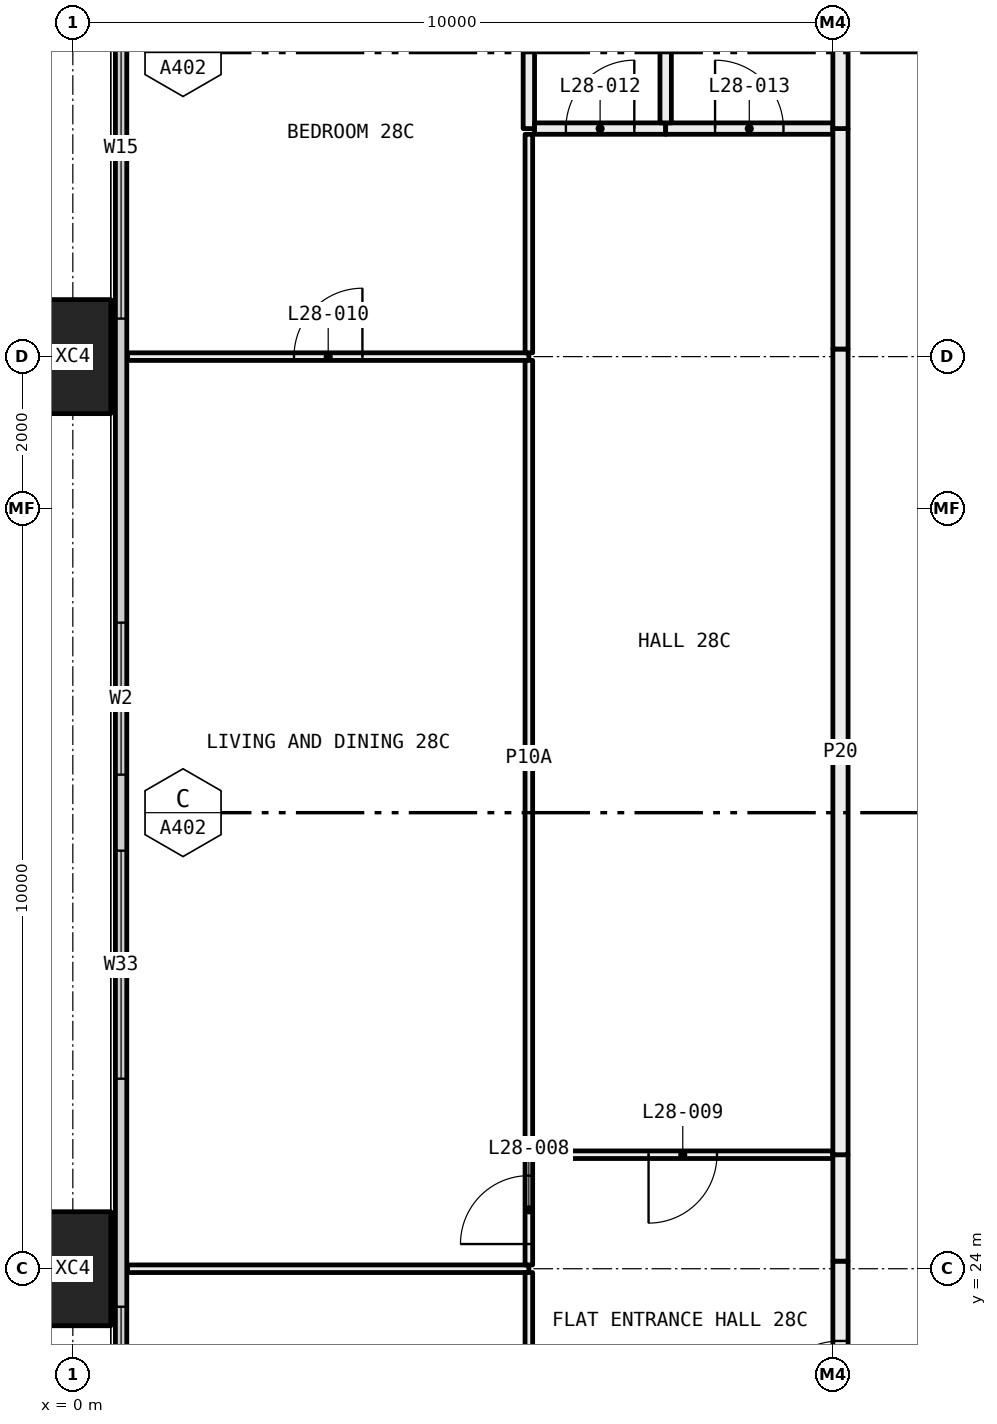
"""IFC4 building model, lengths in metres.
Left out: names, types, materials, properties, quantities, classifications, styles, units other than length and angle.
Written with IfcOpenShell. Run it as: python <this file> out.ifc"""

import sys

from ifc_helpers import new_model, si_unit, direction, frame, frame_2d, origin, origin_2d, place, context, subcontext, project, spatial, rectangle, hollow_rectangle, extrude, element, fill, save


model = new_model("IFC4")
c1 = context("Model", 3, precision=1e-05, world=origin(), true_north=direction((0.0, 1.0)))
c2 = subcontext(c1, "Body", "Model", "MODEL_VIEW")
j1 = project(units=[si_unit("LENGTHUNIT", "METRE"), si_unit("PLANEANGLEUNIT", "RADIAN")], contexts=[c1])
p1 = place(None, origin())
s1 = spatial("IfcSite", under=j1, at=p1, CompositionType="ELEMENT")
p2 = place(p1, origin())
s2 = spatial("IfcBuilding", under=s1, at=p2, CompositionType="ELEMENT")
p3 = place(p2, frame((0.0, 0.0, 110.4)))
s3 = spatial("IfcBuildingStorey", under=s2, at=p3, CompositionType="ELEMENT", Elevation=110.4)
for number, where, z_axis, x_axis in (
    (1, (0.0, 24.0, -0.4), (0.0, 0.0, 1.0), (0.0, 1.0, 0.0)),
    (2, (0.0, 36.0, -0.4), (0.0, 0.0, 1.0), (0.0, 1.0, 0.0)),
):
    element("IfcColumn", number, at=place(p3, frame(where, z_axis=z_axis, x_axis=x_axis)), inside=s3, PredefinedType="COLUMN", context=c2, shape_type="SweptSolid", body=[
        extrude(hollow_rectangle(XDim=1.5, YDim=1.0, WallThickness=0.06, at=origin_2d()), origin(), (0.0, 0.0, 1.0), 3.45),
    ])
p4 = place(p3, frame((0.635, 18.71, 0.0), z_axis=(0.0, 0.0, 1.0), x_axis=(0.0, 1.0, 0.0)))
e3 = element("IfcWall", 3, at=p4, inside=s3, PredefinedType="ELEMENTEDWALL", context=c2, shape_type="SweptSolid", body=[
    extrude(rectangle(XDim=22.58, YDim=0.15, at=frame_2d((11.29, 0.0))), origin(), (0.0, 0.0, 1.0), 3.05),
])
p5 = place(p4, frame((0.29, 0.0, 0.45)))
e4 = element("IfcOpeningElement", 4, at=p5, cuts=e3, PredefinedType="OPENING", context=c2, shape_type="SweptSolid", body=[
    extrude(rectangle(XDim=4.5, YDim=2.55, at=frame_2d((2.25, 1.275))), frame((0.0, 0.085, 0.0), z_axis=(0.0, -1.0, 0.0), x_axis=(1.0, 0.0, 0.0)), (0.0, 0.0, 1.0), 0.17),
])
p6 = place(p4, frame((7.79, 0.0, 0.45)))
e5 = element("IfcOpeningElement", 5, at=p6, cuts=e3, PredefinedType="OPENING", context=c2, shape_type="SweptSolid", body=[
    extrude(rectangle(XDim=3.0, YDim=2.55, at=frame_2d((1.5, 1.275))), frame((0.0, 0.085, 0.0), z_axis=(0.0, -1.0, 0.0), x_axis=(1.0, 0.0, 0.0)), (0.0, 0.0, 1.0), 0.17),
])
p7 = place(p4, frame((11.79, 0.0, 0.45)))
e6 = element("IfcOpeningElement", 6, at=p7, cuts=e3, PredefinedType="OPENING", context=c2, shape_type="SweptSolid", body=[
    extrude(rectangle(XDim=2.0, YDim=2.55, at=frame_2d((1.0, 1.275))), frame((0.0, 0.085, 0.0), z_axis=(0.0, -1.0, 0.0), x_axis=(1.0, 0.0, 0.0)), (0.0, 0.0, 1.0), 0.17),
])
p8 = place(p4, frame((17.79, 0.0, 0.45)))
e7 = element("IfcOpeningElement", 7, at=p8, cuts=e3, PredefinedType="OPENING", context=c2, shape_type="SweptSolid", body=[
    extrude(rectangle(XDim=4.5, YDim=2.55, at=frame_2d((2.25, 1.275))), frame((0.0, 0.085, 0.0), z_axis=(0.0, -1.0, 0.0), x_axis=(1.0, 0.0, 0.0)), (0.0, 0.0, 1.0), 0.17),
])
p9 = place(p3, frame((6.0, 24.0, 0.0), z_axis=(0.0, 0.0, 1.0), x_axis=(-1.0, 0.0, 0.0)))
e8 = element("IfcWall", 8, at=p9, inside=s3, PredefinedType="PARTITIONING", context=c2, shape_type="SweptSolid", body=[
    extrude(rectangle(XDim=5.28, YDim=0.1, at=frame_2d((2.64, 0.0))), origin(), (0.0, 0.0, 1.0), 2.45),
])
p10 = place(p3, frame((6.0, 21.075, 0.0), z_axis=(0.0, 0.0, 1.0), x_axis=(0.0, 1.0, 0.0)))
e9 = element("IfcWall", 9, at=p10, inside=s3, PredefinedType="PARTITIONING", context=c2, shape_type="SweptSolid", body=[
    extrude(rectangle(XDim=2.875, YDim=0.1, at=frame_2d((1.438, 0.0))), origin(), (0.0, 0.0, 1.0), 2.45),
])
p11 = place(p10, frame((0.988, 0.0, 0.0)))
e10 = element("IfcOpeningElement", 10, at=p11, cuts=e9, PredefinedType="OPENING", context=c2, shape_type="SweptSolid", body=[
    extrude(rectangle(XDim=0.9, YDim=2.1, at=frame_2d((0.45, 1.05))), frame((0.0, 0.06, 0.0), z_axis=(0.0, -1.0, 0.0), x_axis=(1.0, 0.0, 0.0)), (0.0, 0.0, 1.0), 0.12),
])
p12 = place(p3, frame((6.0, 36.0, 0.0), z_axis=(0.0, 0.0, 1.0), x_axis=(-1.0, 0.0, 0.0)))
e11 = element("IfcWall", 11, at=p12, inside=s3, PredefinedType="PARTITIONING", context=c2, shape_type="SweptSolid", body=[
    extrude(rectangle(XDim=5.28, YDim=0.1, at=frame_2d((2.64, 0.0))), origin(), (0.0, 0.0, 1.0), 2.45),
])
p13 = place(p12, frame((2.19, 0.0, 0.0)))
e12 = element("IfcOpeningElement", 12, at=p13, cuts=e11, PredefinedType="OPENING", context=c2, shape_type="SweptSolid", body=[
    extrude(rectangle(XDim=0.9, YDim=2.1, at=frame_2d((0.45, 1.05))), frame((0.0, 0.06, 0.0), z_axis=(0.0, -1.0, 0.0), x_axis=(1.0, 0.0, 0.0)), (0.0, 0.0, 1.0), 0.12),
])
p14 = place(p3, frame((6.0, 24.05, 0.0), z_axis=(0.0, 0.0, 1.0), x_axis=(0.0, 1.0, 0.0)))
e13 = element("IfcWall", 13, at=p14, inside=s3, PredefinedType="PARTITIONING", context=c2, shape_type="SweptSolid", body=[
    extrude(rectangle(XDim=1.45, YDim=0.1, at=frame_2d((0.725, 0.0))), origin(), (0.0, 0.0, 1.0), 2.45),
])
p15 = place(p14, frame((0.275, 0.0, 0.0)))
e14 = element("IfcOpeningElement", 14, at=p15, cuts=e13, PredefinedType="OPENING", context=c2, shape_type="SweptSolid", body=[
    extrude(rectangle(XDim=0.9, YDim=2.1, at=frame_2d((0.45, 1.05))), frame((0.0, 0.06, 0.0), z_axis=(0.0, -1.0, 0.0), x_axis=(1.0, 0.0, 0.0)), (0.0, 0.0, 1.0), 0.12),
])
p16 = place(p3, frame((6.0, 25.5, 0.0), z_axis=(0.0, 0.0, 1.0), x_axis=(0.0, 1.0, 0.0)))
e15 = element("IfcWall", 15, at=p16, inside=s3, PredefinedType="PARTITIONING", context=c2, shape_type="SweptSolid", body=[
    extrude(rectangle(XDim=10.45, YDim=0.1, at=frame_2d((5.225, 0.0))), origin(), (0.0, 0.0, 1.0), 2.45),
])
p17 = place(p3, frame((6.0, 36.05, 0.0), z_axis=(0.0, 0.0, 1.0), x_axis=(0.0, 1.0, 0.0)))
e16 = element("IfcWall", 16, at=p17, inside=s3, PredefinedType="PARTITIONING", context=c2, shape_type="SweptSolid", body=[
    extrude(rectangle(XDim=2.875, YDim=0.1, at=frame_2d((1.438, 0.0))), origin(), (0.0, 0.0, 1.0), 2.45),
])
p18 = place(p3, frame((6.0, 39.0, 0.0), z_axis=(0.0, 0.0, 1.0), x_axis=(0.0, 1.0, 0.0)))
e17 = element("IfcWall", 17, at=p18, inside=s3, PredefinedType="PARTITIONING", context=c2, shape_type="SweptSolid", body=[
    extrude(rectangle(XDim=2.28, YDim=0.15, at=frame_2d((1.14, 0.0))), origin(), (0.0, 0.0, 1.0), 3.05),
])
p19 = place(p3, frame((10.0, 25.5, 0.0), z_axis=(0.0, 0.0, 1.0), x_axis=(-1.0, 0.0, 0.0)))
e18 = element("IfcWall", 18, at=p19, inside=s3, PredefinedType="PARTITIONING", context=c2, shape_type="SweptSolid", body=[
    extrude(rectangle(XDim=3.95, YDim=0.1, at=frame_2d((1.975, 0.0))), origin(), (0.0, 0.0, 1.0), 3.05),
])
p20 = place(p19, frame((1.525, 0.0, 0.0)))
e19 = element("IfcOpeningElement", 19, at=p20, cuts=e18, PredefinedType="OPENING", context=c2, shape_type="SweptSolid", body=[
    extrude(rectangle(XDim=0.9, YDim=2.1, at=frame_2d((0.45, 1.05))), frame((0.0, 0.06, 0.0), z_axis=(0.0, -1.0, 0.0), x_axis=(1.0, 0.0, 0.0)), (0.0, 0.0, 1.0), 0.12),
])
p21 = place(p3, frame((10.1, 21.0, 0.0), z_axis=(0.0, 0.0, 1.0), x_axis=(0.0, 1.0, 0.0)))
e20 = element("IfcWall", 20, at=p21, inside=s3, PredefinedType="PARTITIONING", context=c2, shape_type="SweptSolid", body=[
    extrude(rectangle(XDim=3.1, YDim=0.2, at=frame_2d((1.55, 0.0))), origin(), (0.0, 0.0, 1.0), 2.45),
])
p22 = place(p21, frame((1.05, 0.0, 0.0)))
e21 = element("IfcOpeningElement", 21, at=p22, cuts=e20, PredefinedType="OPENING", context=c2, shape_type="SweptSolid", body=[
    extrude(rectangle(XDim=1.0, YDim=2.1, at=frame_2d((0.5, 1.05))), frame((0.0, 0.11, 0.0), z_axis=(0.0, -1.0, 0.0), x_axis=(1.0, 0.0, 0.0)), (0.0, 0.0, 1.0), 0.22),
])
p23 = place(p3, frame((10.1, 24.1, 0.0), z_axis=(0.0, 0.0, 1.0), x_axis=(0.0, 1.0, 0.0)))
e22 = element("IfcWall", 22, at=p23, inside=s3, PredefinedType="PARTITIONING", context=c2, shape_type="SweptSolid", body=[
    extrude(rectangle(XDim=1.4, YDim=0.2, at=frame_2d((0.7, 0.0))), origin(), (0.0, 0.0, 1.0), 3.05),
])
p24 = place(p3, frame((7.8, 39.0, 0.0), z_axis=(0.0, 0.0, 1.0), x_axis=(-1.0, 0.0, 0.0)))
e23 = element("IfcWall", 23, at=p24, inside=s3, PredefinedType="PARTITIONING", context=c2, shape_type="SweptSolid", body=[
    extrude(rectangle(XDim=1.725, YDim=0.15, at=frame_2d((0.863, 0.0))), origin(), (0.0, 0.0, 1.0), 3.05),
])
p25 = place(p24, frame((0.413, 0.0, 0.0)))
e24 = element("IfcOpeningElement", 24, at=p25, cuts=e23, PredefinedType="OPENING", context=c2, shape_type="SweptSolid", body=[
    extrude(rectangle(XDim=0.9, YDim=2.1, at=frame_2d((0.45, 1.05))), frame((0.0, 0.085, 0.0), z_axis=(0.0, -1.0, 0.0), x_axis=(1.0, 0.0, 0.0)), (0.0, 0.0, 1.0), 0.17),
])
p26 = place(p3, frame((10.0, 39.0, 0.0), z_axis=(0.0, 0.0, 1.0), x_axis=(-1.0, 0.0, 0.0)))
e25 = element("IfcWall", 25, at=p26, inside=s3, PredefinedType="PARTITIONING", context=c2, shape_type="SweptSolid", body=[
    extrude(rectangle(XDim=2.2, YDim=0.15, at=frame_2d((1.1, 0.0))), origin(), (0.0, 0.0, 1.0), 3.05),
])
p27 = place(p26, frame((0.65, 0.0, 0.0)))
e26 = element("IfcOpeningElement", 26, at=p27, cuts=e25, PredefinedType="OPENING", context=c2, shape_type="SweptSolid", body=[
    extrude(rectangle(XDim=0.9, YDim=2.1, at=frame_2d((0.45, 1.05))), frame((0.0, 0.085, 0.0), z_axis=(0.0, -1.0, 0.0), x_axis=(1.0, 0.0, 0.0)), (0.0, 0.0, 1.0), 0.17),
])
p28 = place(p3, frame((10.1, 25.5, 0.0), z_axis=(0.0, 0.0, 1.0), x_axis=(0.0, 1.0, 0.0)))
e27 = element("IfcWall", 27, at=p28, inside=s3, PredefinedType="PARTITIONING", context=c2, shape_type="SweptSolid", body=[
    extrude(rectangle(XDim=10.6, YDim=0.2, at=frame_2d((5.3, 0.0))), origin(), (0.0, 0.0, 1.0), 2.45),
])
p29 = place(p3, frame((10.1, 36.1, 0.0), z_axis=(0.0, 0.0, 1.0), x_axis=(0.0, 1.0, 0.0)))
e28 = element("IfcWall", 28, at=p29, inside=s3, PredefinedType="PARTITIONING", context=c2, shape_type="SweptSolid", body=[
    extrude(rectangle(XDim=2.9, YDim=0.2, at=frame_2d((1.45, 0.0))), origin(), (0.0, 0.0, 1.0), 3.05),
])
p30 = place(p3, frame((7.8, 39.075, 0.0), z_axis=(0.0, 0.0, 1.0), x_axis=(0.0, 1.0, 0.0)))
e29 = element("IfcWall", 29, at=p30, inside=s3, PredefinedType="PARTITIONING", context=c2, shape_type="SweptSolid", body=[
    extrude(rectangle(XDim=2.825, YDim=0.15, at=frame_2d((1.413, 0.0))), origin(), (0.0, 0.0, 1.0), 3.05),
])
p31 = place(p3, frame((10.1, 39.0, 0.0), z_axis=(0.0, 0.0, 1.0), x_axis=(0.0, 1.0, 0.0)))
e30 = element("IfcWall", 30, at=p31, inside=s3, PredefinedType="PARTITIONING", context=c2, shape_type="SweptSolid", body=[
    extrude(rectangle(XDim=2.9, YDim=0.2, at=frame_2d((1.45, 0.0))), origin(), (0.0, 0.0, 1.0), 3.05),
])
p32 = place(p5, origin())
e31 = element("IfcWindow", 31, at=p32, inside=s3, PartitioningType="SINGLE_PANEL", PredefinedType="WINDOW", context=c2, shape_type="SweptSolid", body=[
    extrude(rectangle(XDim=4.5, YDim=2.55, at=frame_2d((2.25, 1.275))), frame((0.0, 0.03, 0.0), z_axis=(0.0, -1.0, 0.0), x_axis=(1.0, 0.0, 0.0)), (0.0, 0.0, 1.0), 0.06),
])
fill(e4, e31)
p33 = place(p6, origin())
e32 = element("IfcWindow", 32, at=p33, inside=s3, PartitioningType="SINGLE_PANEL", PredefinedType="WINDOW", context=c2, shape_type="SweptSolid", body=[
    extrude(rectangle(XDim=3.0, YDim=2.55, at=frame_2d((1.5, 1.275))), frame((0.0, 0.03, 0.0), z_axis=(0.0, -1.0, 0.0), x_axis=(1.0, 0.0, 0.0)), (0.0, 0.0, 1.0), 0.06),
])
fill(e5, e32)
p34 = place(p7, origin())
e33 = element("IfcWindow", 33, at=p34, inside=s3, PartitioningType="SINGLE_PANEL", PredefinedType="WINDOW", context=c2, shape_type="SweptSolid", body=[
    extrude(rectangle(XDim=2.0, YDim=2.55, at=frame_2d((1.0, 1.275))), frame((0.0, 0.03, 0.0), z_axis=(0.0, -1.0, 0.0), x_axis=(1.0, 0.0, 0.0)), (0.0, 0.0, 1.0), 0.06),
])
fill(e6, e33)
p35 = place(p8, origin())
e34 = element("IfcWindow", 34, at=p35, inside=s3, PartitioningType="SINGLE_PANEL", PredefinedType="WINDOW", context=c2, shape_type="SweptSolid", body=[
    extrude(rectangle(XDim=4.5, YDim=2.55, at=frame_2d((2.25, 1.275))), frame((0.0, 0.03, 0.0), z_axis=(0.0, -1.0, 0.0), x_axis=(1.0, 0.0, 0.0)), (0.0, 0.0, 1.0), 0.06),
])
fill(e7, e34)
p36 = place(p22, origin())
e35 = element("IfcDoor", 35, at=p36, inside=s3, OperationType="SINGLE_SWING_RIGHT", PredefinedType="DOOR", context=c2, shape_type="SweptSolid", body=[
    extrude(rectangle(XDim=1.0, YDim=2.1, at=frame_2d((0.5, 1.05))), frame((0.0, 0.025, 0.0), z_axis=(0.0, -1.0, 0.0), x_axis=(1.0, 0.0, 0.0)), (0.0, 0.0, 1.0), 0.05),
])
fill(e21, e35)
p37 = place(p15, origin())
e36 = element("IfcDoor", 36, at=p37, inside=s3, OperationType="SINGLE_SWING_RIGHT", PredefinedType="DOOR", context=c2, shape_type="SweptSolid", body=[
    extrude(rectangle(XDim=0.9, YDim=2.1, at=frame_2d((0.45, 1.05))), frame((0.0, 0.025, 0.0), z_axis=(0.0, -1.0, 0.0), x_axis=(1.0, 0.0, 0.0)), (0.0, 0.0, 1.0), 0.05),
])
fill(e14, e36)
p38 = place(p20, origin())
e37 = element("IfcDoor", 37, at=p38, inside=s3, OperationType="SINGLE_SWING_LEFT", PredefinedType="DOOR", context=c2, shape_type="SweptSolid", body=[
    extrude(rectangle(XDim=0.9, YDim=2.1, at=frame_2d((0.45, 1.05))), frame((0.0, 0.025, 0.0), z_axis=(0.0, -1.0, 0.0), x_axis=(1.0, 0.0, 0.0)), (0.0, 0.0, 1.0), 0.05),
])
fill(e19, e37)
p39 = place(p13, frame((0.9, 0.0, 0.0), x_axis=(-1.0, 0.0, 0.0)))
e38 = element("IfcDoor", 38, at=p39, inside=s3, OperationType="SINGLE_SWING_LEFT", PredefinedType="DOOR", context=c2, shape_type="SweptSolid", body=[
    extrude(rectangle(XDim=0.9, YDim=2.1, at=frame_2d((0.45, 1.05))), frame((0.0, 0.025, 0.0), z_axis=(0.0, -1.0, 0.0), x_axis=(1.0, 0.0, 0.0)), (0.0, 0.0, 1.0), 0.05),
])
fill(e12, e38)
p40 = place(p25, frame((0.9, 0.0, 0.0), x_axis=(-1.0, 0.0, 0.0)))
e39 = element("IfcDoor", 39, at=p40, inside=s3, OperationType="SINGLE_SWING_LEFT", PredefinedType="DOOR", context=c2, shape_type="SweptSolid", body=[
    extrude(rectangle(XDim=0.9, YDim=2.1, at=frame_2d((0.45, 1.05))), frame((0.0, 0.025, 0.0), z_axis=(0.0, -1.0, 0.0), x_axis=(1.0, 0.0, 0.0)), (0.0, 0.0, 1.0), 0.05),
])
fill(e24, e39)
p41 = place(p27, frame((0.9, 0.0, 0.0), x_axis=(-1.0, 0.0, 0.0)))
e40 = element("IfcDoor", 40, at=p41, inside=s3, OperationType="SINGLE_SWING_RIGHT", PredefinedType="DOOR", context=c2, shape_type="SweptSolid", body=[
    extrude(rectangle(XDim=0.9, YDim=2.1, at=frame_2d((0.45, 1.05))), frame((0.0, 0.025, 0.0), z_axis=(0.0, -1.0, 0.0), x_axis=(1.0, 0.0, 0.0)), (0.0, 0.0, 1.0), 0.05),
])
fill(e26, e40)
save(model, sys.argv[1])
